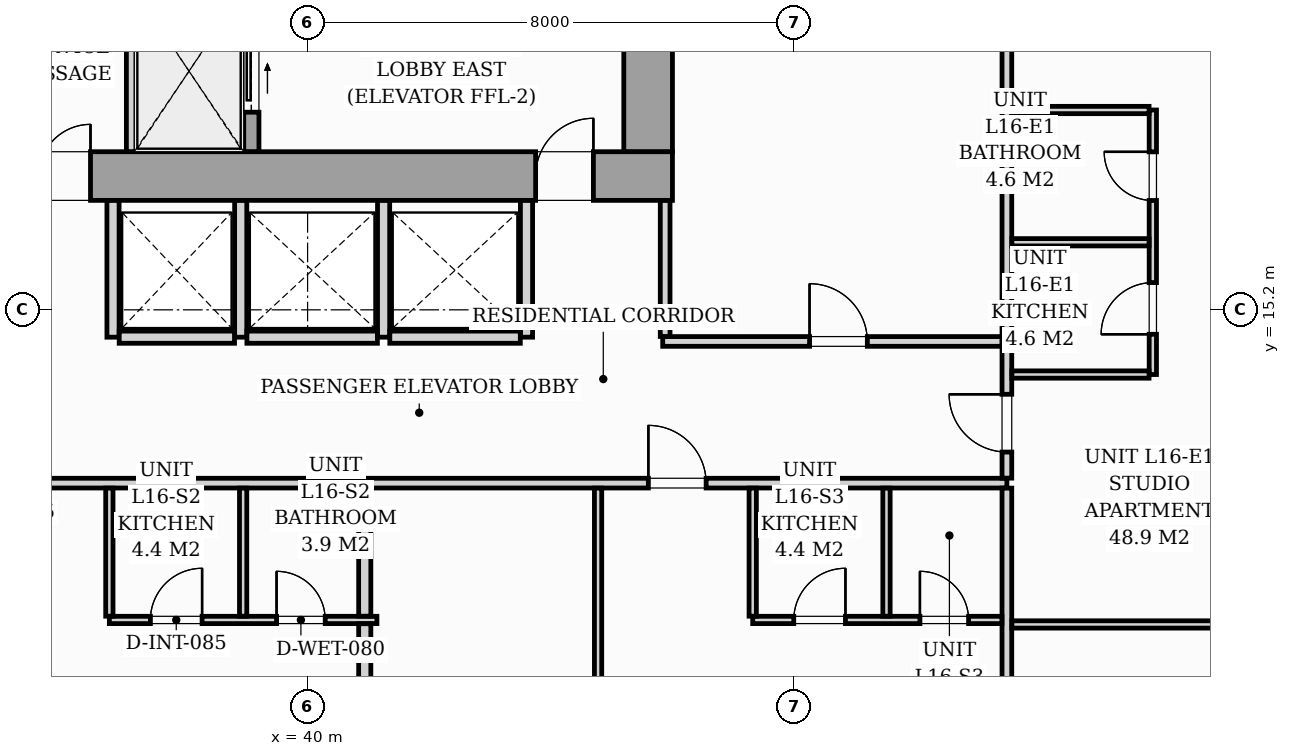
"""IFC4 building model, lengths in metres.
Left out: names, types, materials, properties, quantities, classifications, styles, units other than length and angle.
Written with IfcOpenShell. Run it as: python <this file> out.ifc"""

import sys

from ifc_helpers import new_model, si_unit, direction, frame, frame_2d, origin, origin_2d, place, context, subcontext, project, spatial, rectangle, i_section, extrude, source, transform, mapped, element, fill, save


model = new_model("IFC4")
c1 = context("Model", 3, precision=1e-05, world=origin(), true_north=direction((0.0, 1.0)))
c2 = subcontext(c1, "Body", "Model", "MODEL_VIEW")
j1 = project(units=[si_unit("LENGTHUNIT", "METRE"), si_unit("PLANEANGLEUNIT", "RADIAN")], contexts=[c1])
p1 = place(None, origin())
s1 = spatial("IfcSite", under=j1, at=p1, CompositionType="ELEMENT")
p2 = place(p1, origin())
s2 = spatial("IfcBuilding", under=s1, at=p2, CompositionType="ELEMENT")
p3 = place(p2, frame((0.0, 0.0, 58.2)))
s3 = spatial("IfcBuildingStorey", under=s2, at=p3, CompositionType="ELEMENT", Elevation=58.2)
m1 = source(origin(), c2, "Body", "SweptSolid", [
    extrude(i_section(OverallWidth=0.437, OverallDepth=0.514, WebThickness=0.061, FlangeThickness=0.097, FilletRadius=0.018, at=origin_2d()), origin(), (0.0, 0.0, 1.0), 3.196),
])
for number, where, z_axis, x_axis in (
    (1, (38.88, 17.4, 0.002), (0.0, 0.0, 1.0), (1.0, 0.0, 0.0)),
    (2, (45.6, 17.4, 0.002), (0.0, 0.0, 1.0), (1.0, 0.0, 0.0)),
):
    element("IfcColumn", number, at=place(p3, frame(where, z_axis=z_axis, x_axis=x_axis)), inside=s3, PredefinedType="PILASTER", context=c2, shape_type="MappedRepresentation", body=[
        mapped(m1, transform((0.0, 0.0, 0.0), scale=1.0)),
    ])
p4 = place(p3, frame((26.0, 17.4, 0.0), z_axis=(0.0, 0.0, 1.0), x_axis=(1.0, 0.0, 0.0)))
e3 = element("IfcWall", 3, at=p4, inside=s3, PredefinedType="SHEAR", context=c2, shape_type="SweptSolid", body=[
    extrude(rectangle(XDim=20.0, YDim=0.8, at=frame_2d((10.0, 0.0))), origin(), (0.0, 0.0, 1.0), 3.2),
])
p5 = place(p4, frame((1.15, 0.0, 0.0)))
e4 = element("IfcOpeningElement", 4, at=p5, cuts=e3, PredefinedType="OPENING", context=c2, shape_type="SweptSolid", body=[
    extrude(rectangle(XDim=0.95, YDim=2.06, at=frame_2d((0.475, 1.03))), frame((0.0, 0.41, 0.0), z_axis=(0.0, -1.0, 0.0), x_axis=(1.0, 0.0, 0.0)), (0.0, 0.0, 1.0), 0.82),
])
p6 = place(p4, frame((9.58, 0.0, 0.0)))
e5 = element("IfcOpeningElement", 5, at=p6, cuts=e3, PredefinedType="OPENING", context=c2, shape_type="SweptSolid", body=[
    extrude(rectangle(XDim=0.85, YDim=2.0, at=frame_2d((0.425, 1.0))), frame((0.0, 0.41, 0.0), z_axis=(0.0, -1.0, 0.0), x_axis=(1.0, 0.0, 0.0)), (0.0, 0.0, 1.0), 0.82),
])
p7 = place(p4, frame((17.75, 0.0, 0.0)))
e6 = element("IfcOpeningElement", 6, at=p7, cuts=e3, PredefinedType="OPENING", context=c2, shape_type="SweptSolid", body=[
    extrude(rectangle(XDim=0.95, YDim=2.06, at=frame_2d((0.475, 1.03))), frame((0.0, 0.41, 0.0), z_axis=(0.0, -1.0, 0.0), x_axis=(1.0, 0.0, 0.0)), (0.0, 0.0, 1.0), 0.82),
])
p8 = place(p3, frame((45.6, 17.802, 0.0), z_axis=(0.0, 0.0, 1.0), x_axis=(0.0, 1.0, 0.0)))
e7 = element("IfcWall", 7, at=p8, inside=s3, PredefinedType="SHEAR", context=c2, shape_type="SweptSolid", body=[
    extrude(rectangle(XDim=5.796, YDim=0.8, at=frame_2d((2.898, 0.0))), origin(), (0.0, 0.0, 1.0), 3.2),
])
p9 = place(p3, frame((37.1, 17.802, 0.0), z_axis=(0.0, 0.0, 1.0), x_axis=(0.0, 1.0, 0.0)))
e8 = element("IfcWall", 8, at=p9, inside=s3, PredefinedType="PARTITIONING", context=c2, shape_type="SweptSolid", body=[
    extrude(rectangle(XDim=2.646, YDim=0.16, at=frame_2d((1.323, 0.0))), origin(), (0.0, 0.0, 1.0), 2.94),
])
p10 = place(p3, frame((39.075, 17.802, 0.0), z_axis=(0.0, 0.0, 1.0), x_axis=(0.0, 1.0, 0.0)))
e9 = element("IfcWall", 9, at=p10, inside=s3, PredefinedType="SOLIDWALL", context=c2, shape_type="SweptSolid", body=[
    extrude(rectangle(XDim=2.646, YDim=0.25, at=frame_2d((1.323, 0.0))), origin(), (0.0, 0.0, 1.0), 3.2),
])
p11 = place(p10, frame((0.648, 0.0, 0.0)))
e10 = element("IfcOpeningElement", 10, at=p11, cuts=e9, PredefinedType="OPENING", context=c2, shape_type="SweptSolid", body=[
    extrude(rectangle(XDim=1.1, YDim=2.08, at=frame_2d((0.55, 1.04))), frame((0.0, 0.135, 0.0), z_axis=(0.0, -1.0, 0.0), x_axis=(1.0, 0.0, 0.0)), (0.0, 0.0, 1.0), 0.27),
])
for number, where, z_axis, x_axis in (
    (11, (36.8, 14.75, 0.0), (0.0, 0.0, 1.0), (0.0, 1.0, 0.0)),
    (12, (38.9, 14.75, 0.0), (0.0, 0.0, 1.0), (0.0, 1.0, 0.0)),
):
    element("IfcWall", number, at=place(p3, frame(where, z_axis=z_axis, x_axis=x_axis)), inside=s3, PredefinedType="PARTITIONING", context=c2, shape_type="SweptSolid", body=[
        extrude(rectangle(XDim=2.248, YDim=0.2, at=frame_2d((1.124, 0.0))), origin(), (0.0, 0.0, 1.0), 2.94),
    ])
p12 = place(p3, frame((36.902, 14.75, 0.0), z_axis=(0.0, 0.0, 1.0), x_axis=(1.0, 0.0, 0.0)))
e13 = element("IfcWall", 13, at=p12, inside=s3, PredefinedType="PARTITIONING", context=c2, shape_type="SweptSolid", body=[
    extrude(rectangle(XDim=1.896, YDim=0.2, at=frame_2d((0.948, 0.0))), origin(), (0.0, 0.0, 1.0), 2.94),
])
for number, where, z_axis, x_axis in (
    (14, (41.25, 14.75, 0.0), (0.0, 0.0, 1.0), (0.0, 1.0, 0.0)),
    (15, (43.6, 14.75, 0.0), (0.0, 0.0, 1.0), (0.0, 1.0, 0.0)),
):
    element("IfcWall", number, at=place(p3, frame(where, z_axis=z_axis, x_axis=x_axis)), inside=s3, PredefinedType="PARTITIONING", context=c2, shape_type="SweptSolid", body=[
        extrude(rectangle(XDim=2.248, YDim=0.2, at=frame_2d((1.124, 0.0))), origin(), (0.0, 0.0, 1.0), 2.94),
    ])
for number, where, z_axis, x_axis in (
    (16, (39.002, 14.75, 0.0), (0.0, 0.0, 1.0), (1.0, 0.0, 0.0)),
    (17, (41.352, 14.75, 0.0), (0.0, 0.0, 1.0), (1.0, 0.0, 0.0)),
):
    element("IfcWall", number, at=place(p3, frame(where, z_axis=z_axis, x_axis=x_axis)), inside=s3, PredefinedType="PARTITIONING", context=c2, shape_type="SweptSolid", body=[
        extrude(rectangle(XDim=2.146, YDim=0.2, at=frame_2d((1.073, 0.0))), origin(), (0.0, 0.0, 1.0), 2.94),
    ])
p13 = place(p3, frame((16.3, 12.35, 0.0), z_axis=(0.0, 0.0, 1.0), x_axis=(1.0, 0.0, 0.0)))
e18 = element("IfcWall", 18, at=p13, inside=s3, PredefinedType="PARTITIONING", context=c2, shape_type="SweptSolid", body=[
    extrude(rectangle(XDim=35.2, YDim=0.16, at=frame_2d((17.6, 0.0))), origin(), (0.0, 0.0, 1.0), 2.94),
])
p14 = place(p13, frame((6.307, 0.0, 0.0)))
e19 = element("IfcOpeningElement", 19, at=p14, cuts=e18, PredefinedType="OPENING", context=c2, shape_type="SweptSolid", body=[
    extrude(rectangle(XDim=0.95, YDim=2.06, at=frame_2d((0.475, 1.03))), frame((0.0, 0.09, 0.0), z_axis=(0.0, -1.0, 0.0), x_axis=(1.0, 0.0, 0.0)), (0.0, 0.0, 1.0), 0.18),
])
p15 = place(p13, frame((18.392, 0.0, 0.0)))
e20 = element("IfcOpeningElement", 20, at=p15, cuts=e18, PredefinedType="OPENING", context=c2, shape_type="SweptSolid", body=[
    extrude(rectangle(XDim=0.95, YDim=2.06, at=frame_2d((0.475, 1.03))), frame((0.0, 0.09, 0.0), z_axis=(0.0, -1.0, 0.0), x_axis=(1.0, 0.0, 0.0)), (0.0, 0.0, 1.0), 0.18),
])
p16 = place(p13, frame((29.304, 0.0, 0.0)))
e21 = element("IfcOpeningElement", 21, at=p16, cuts=e18, PredefinedType="OPENING", context=c2, shape_type="SweptSolid", body=[
    extrude(rectangle(XDim=0.95, YDim=2.06, at=frame_2d((0.475, 1.03))), frame((0.0, 0.09, 0.0), z_axis=(0.0, -1.0, 0.0), x_axis=(1.0, 0.0, 0.0)), (0.0, 0.0, 1.0), 0.18),
])
p17 = place(p3, frame((51.5, 2.962, 0.0), z_axis=(0.0, 0.0, 1.0), x_axis=(0.0, 1.0, 0.0)))
e22 = element("IfcWall", 22, at=p17, inside=s3, PredefinedType="PARTITIONING", context=c2, shape_type="SweptSolid", body=[
    extrude(rectangle(XDim=9.306, YDim=0.16, at=frame_2d((4.653, 0.0))), origin(), (0.0, 0.0, 1.0), 2.94),
])
p18 = place(p3, frame((51.5, 12.432, 0.0), z_axis=(0.0, 0.0, 1.0), x_axis=(0.0, 1.0, 0.0)))
e23 = element("IfcWall", 23, at=p18, inside=s3, PredefinedType="PARTITIONING", context=c2, shape_type="SweptSolid", body=[
    extrude(rectangle(XDim=15.006, YDim=0.16, at=frame_2d((7.503, 0.0))), origin(), (0.0, 0.0, 1.0), 2.94),
])
p19 = place(p18, frame((0.429, 0.0, 0.0)))
e24 = element("IfcOpeningElement", 24, at=p19, cuts=e23, PredefinedType="OPENING", context=c2, shape_type="SweptSolid", body=[
    extrude(rectangle(XDim=0.95, YDim=2.06, at=frame_2d((0.475, 1.03))), frame((0.0, 0.09, 0.0), z_axis=(0.0, -1.0, 0.0), x_axis=(1.0, 0.0, 0.0)), (0.0, 0.0, 1.0), 0.18),
])
p20 = place(p3, frame((36.74, 10.1, 0.0), z_axis=(0.0, 0.0, 1.0), x_axis=(1.0, 0.0, 0.0)))
e25 = element("IfcWall", 25, at=p20, inside=s3, PredefinedType="PARTITIONING", context=c2, shape_type="SweptSolid", body=[
    extrude(rectangle(XDim=4.4, YDim=0.12, at=frame_2d((2.2, 0.0))), origin(), (0.0, 0.0, 1.0), 2.94),
])
p21 = place(p20, frame((0.675, 0.0, 0.0)))
e26 = element("IfcOpeningElement", 26, at=p21, cuts=e25, PredefinedType="OPENING", context=c2, shape_type="SweptSolid", body=[
    extrude(rectangle(XDim=0.85, YDim=2.05, at=frame_2d((0.425, 1.025))), frame((0.0, 0.07, 0.0), z_axis=(0.0, -1.0, 0.0), x_axis=(1.0, 0.0, 0.0)), (0.0, 0.0, 1.0), 0.14),
])
p22 = place(p20, frame((2.75, 0.0, 0.0)))
e27 = element("IfcOpeningElement", 27, at=p22, cuts=e25, PredefinedType="OPENING", context=c2, shape_type="SweptSolid", body=[
    extrude(rectangle(XDim=0.8, YDim=2.02, at=frame_2d((0.4, 1.01))), frame((0.0, 0.07, 0.0), z_axis=(0.0, -1.0, 0.0), x_axis=(1.0, 0.0, 0.0)), (0.0, 0.0, 1.0), 0.14),
])
for number, where, z_axis, x_axis in (
    (28, (36.74, 10.162, 0.0), (0.0, 0.0, 1.0), (0.0, 1.0, 0.0)),
    (29, (38.94, 10.162, 0.0), (0.0, 0.0, 1.0), (0.0, 1.0, 0.0)),
):
    element("IfcWall", number, at=place(p3, frame(where, z_axis=z_axis, x_axis=x_axis)), inside=s3, PredefinedType="PARTITIONING", context=c2, shape_type="SweptSolid", body=[
        extrude(rectangle(XDim=2.106, YDim=0.12, at=frame_2d((1.053, 0.0))), origin(), (0.0, 0.0, 1.0), 2.94),
    ])
p23 = place(p3, frame((40.94, 2.962, 0.0), z_axis=(0.0, 0.0, 1.0), x_axis=(0.0, 1.0, 0.0)))
e30 = element("IfcWall", 30, at=p23, inside=s3, PredefinedType="PARTITIONING", context=c2, shape_type="SweptSolid", body=[
    extrude(rectangle(XDim=7.076, YDim=0.2, at=frame_2d((3.538, 0.0))), origin(), (0.0, 0.0, 1.0), 2.94),
])
p24 = place(p3, frame((40.94, 10.162, 0.0), z_axis=(0.0, 0.0, 1.0), x_axis=(0.0, 1.0, 0.0)))
e31 = element("IfcWall", 31, at=p24, inside=s3, PredefinedType="PARTITIONING", context=c2, shape_type="SweptSolid", body=[
    extrude(rectangle(XDim=2.106, YDim=0.2, at=frame_2d((1.053, 0.0))), origin(), (0.0, 0.0, 1.0), 2.94),
])
p25 = place(p3, frame((47.32, 10.1, 0.0), z_axis=(0.0, 0.0, 1.0), x_axis=(1.0, 0.0, 0.0)))
e32 = element("IfcWall", 32, at=p25, inside=s3, PredefinedType="PARTITIONING", context=c2, shape_type="SweptSolid", body=[
    extrude(rectangle(XDim=4.098, YDim=0.12, at=frame_2d((2.049, 0.0))), origin(), (0.0, 0.0, 1.0), 2.94),
])
p26 = place(p25, frame((0.675, 0.0, 0.0)))
e33 = element("IfcOpeningElement", 33, at=p26, cuts=e32, PredefinedType="OPENING", context=c2, shape_type="SweptSolid", body=[
    extrude(rectangle(XDim=0.85, YDim=2.05, at=frame_2d((0.425, 1.025))), frame((0.0, 0.07, 0.0), z_axis=(0.0, -1.0, 0.0), x_axis=(1.0, 0.0, 0.0)), (0.0, 0.0, 1.0), 0.14),
])
p27 = place(p25, frame((2.75, 0.0, 0.0)))
e34 = element("IfcOpeningElement", 34, at=p27, cuts=e32, PredefinedType="OPENING", context=c2, shape_type="SweptSolid", body=[
    extrude(rectangle(XDim=0.8, YDim=2.02, at=frame_2d((0.4, 1.01))), frame((0.0, 0.07, 0.0), z_axis=(0.0, -1.0, 0.0), x_axis=(1.0, 0.0, 0.0)), (0.0, 0.0, 1.0), 0.14),
])
for number, where, z_axis, x_axis in (
    (35, (47.32, 10.162, 0.0), (0.0, 0.0, 1.0), (0.0, 1.0, 0.0)),
    (36, (49.52, 10.162, 0.0), (0.0, 0.0, 1.0), (0.0, 1.0, 0.0)),
):
    element("IfcWall", number, at=place(p3, frame(where, z_axis=z_axis, x_axis=x_axis)), inside=s3, PredefinedType="PARTITIONING", context=c2, shape_type="SweptSolid", body=[
        extrude(rectangle(XDim=2.106, YDim=0.12, at=frame_2d((1.053, 0.0))), origin(), (0.0, 0.0, 1.0), 2.94),
    ])
p28 = place(p3, frame((44.777, 2.962, 0.0), z_axis=(0.0, 0.0, 1.0), x_axis=(0.0, 1.0, 0.0)))
e37 = element("IfcWall", 37, at=p28, inside=s3, PredefinedType="PARTITIONING", context=c2, shape_type="SweptSolid", body=[
    extrude(rectangle(XDim=9.306, YDim=0.12, at=frame_2d((4.653, 0.0))), origin(), (0.0, 0.0, 1.0), 2.136),
])
p29 = place(p28, frame((4.218, 0.0, 0.0)))
e38 = element("IfcOpeningElement", 38, at=p29, cuts=e37, PredefinedType="OPENING", context=c2, shape_type="SweptSolid", body=[
    extrude(rectangle(XDim=0.85, YDim=2.01, at=frame_2d((0.425, 1.005))), frame((0.0, 0.07, 0.0), z_axis=(0.0, -1.0, 0.0), x_axis=(1.0, 0.0, 0.0)), (0.0, 0.0, 1.0), 0.14),
])
p30 = place(p3, frame((53.9, 14.136, 0.0), z_axis=(0.0, 0.0, 1.0), x_axis=(0.0, 1.0, 0.0)))
e39 = element("IfcWall", 39, at=p30, inside=s3, PredefinedType="PARTITIONING", context=c2, shape_type="SweptSolid", body=[
    extrude(rectangle(XDim=4.35, YDim=0.12, at=frame_2d((2.175, 0.0))), origin(), (0.0, 0.0, 1.0), 2.94),
])
p31 = place(p30, frame((0.662, 0.0, 0.0)))
e40 = element("IfcOpeningElement", 40, at=p31, cuts=e39, PredefinedType="OPENING", context=c2, shape_type="SweptSolid", body=[
    extrude(rectangle(XDim=0.85, YDim=2.05, at=frame_2d((0.425, 1.025))), frame((0.0, 0.07, 0.0), z_axis=(0.0, -1.0, 0.0), x_axis=(1.0, 0.0, 0.0)), (0.0, 0.0, 1.0), 0.14),
])
p32 = place(p30, frame((2.862, 0.0, 0.0)))
e41 = element("IfcOpeningElement", 41, at=p32, cuts=e39, PredefinedType="OPENING", context=c2, shape_type="SweptSolid", body=[
    extrude(rectangle(XDim=0.8, YDim=2.02, at=frame_2d((0.4, 1.01))), frame((0.0, 0.07, 0.0), z_axis=(0.0, -1.0, 0.0), x_axis=(1.0, 0.0, 0.0)), (0.0, 0.0, 1.0), 0.14),
])
p33 = place(p3, frame((51.582, 16.311, 0.0), z_axis=(0.0, 0.0, 1.0), x_axis=(1.0, 0.0, 0.0)))
e42 = element("IfcWall", 42, at=p33, inside=s3, PredefinedType="PARTITIONING", context=c2, shape_type="SweptSolid", body=[
    extrude(rectangle(XDim=2.256, YDim=0.12, at=frame_2d((1.128, 0.0))), origin(), (0.0, 0.0, 1.0), 2.045),
])
for number, where, z_axis, x_axis in (
    (43, (51.582, 14.136, 0.0), (0.0, 0.0, 1.0), (1.0, 0.0, 0.0)),
    (44, (51.582, 18.486, 0.0), (0.0, 0.0, 1.0), (1.0, 0.0, 0.0)),
):
    element("IfcWall", number, at=place(p3, frame(where, z_axis=z_axis, x_axis=x_axis)), inside=s3, PredefinedType="PARTITIONING", context=c2, shape_type="SweptSolid", body=[
        extrude(rectangle(XDim=2.256, YDim=0.12, at=frame_2d((1.128, 0.0))), origin(), (0.0, 0.0, 1.0), 2.94),
    ])
p34 = place(p3, frame((51.582, 10.026, 0.0), z_axis=(0.0, 0.0, 1.0), x_axis=(1.0, 0.0, 0.0)))
e45 = element("IfcWall", 45, at=p34, inside=s3, PredefinedType="PARTITIONING", context=c2, shape_type="SweptSolid", body=[
    extrude(rectangle(XDim=8.138, YDim=0.12, at=frame_2d((4.069, 0.0))), origin(), (0.0, 0.0, 1.0), 2.94),
])
p35 = place(p34, frame((3.653, 0.0, 0.0)))
e46 = element("IfcOpeningElement", 46, at=p35, cuts=e45, PredefinedType="OPENING", context=c2, shape_type="SweptSolid", body=[
    extrude(rectangle(XDim=0.85, YDim=2.05, at=frame_2d((0.425, 1.025))), frame((0.0, 0.07, 0.0), z_axis=(0.0, -1.0, 0.0), x_axis=(1.0, 0.0, 0.0)), (0.0, 0.0, 1.0), 0.14),
])
p36 = place(p3, frame((45.84, 14.68, 0.0), z_axis=(0.0, 0.0, 1.0), x_axis=(1.0, 0.0, 0.0)))
e47 = element("IfcWall", 47, at=p36, inside=s3, PredefinedType="PARTITIONING", context=c2, shape_type="SweptSolid", body=[
    extrude(rectangle(XDim=5.578, YDim=0.16, at=frame_2d((2.789, 0.0))), origin(), (0.0, 0.0, 1.0), 2.94),
])
p37 = place(p36, frame((2.415, 0.0, 0.0)))
e48 = element("IfcOpeningElement", 48, at=p37, cuts=e47, PredefinedType="OPENING", context=c2, shape_type="SweptSolid", body=[
    extrude(rectangle(XDim=0.95, YDim=2.06, at=frame_2d((0.475, 1.03))), frame((0.0, 0.09, 0.0), z_axis=(0.0, -1.0, 0.0), x_axis=(1.0, 0.0, 0.0)), (0.0, 0.0, 1.0), 0.18),
])
p38 = place(p3, frame((45.88, 14.762, 0.0), z_axis=(0.0, 0.0, 1.0), x_axis=(0.0, 1.0, 0.0)))
e49 = element("IfcWall", 49, at=p38, inside=s3, PredefinedType="PARTITIONING", context=c2, shape_type="SweptSolid", body=[
    extrude(rectangle(XDim=2.236, YDim=0.16, at=frame_2d((1.118, 0.0))), origin(), (0.0, 0.0, 1.0), 2.94),
])
m2 = source(origin(), c2, "Body", "SweptSolid", [
    extrude(rectangle(XDim=0.85, YDim=2.0, at=frame_2d((0.425, 1.0))), frame((0.0, 0.025, 0.0), z_axis=(0.0, -1.0, 0.0), x_axis=(1.0, 0.0, 0.0)), (0.0, 0.0, 1.0), 0.05),
])
p39 = place(p6, origin())
e50 = element("IfcDoor", 50, at=p39, inside=s3, OperationType="SINGLE_SWING_RIGHT", PredefinedType="DOOR", context=c2, shape_type="MappedRepresentation", body=[
    mapped(m2, transform((0.0, 0.0, 0.0), scale=1.0)),
])
fill(e5, e50)
m3 = source(origin(), c2, "Body", "SweptSolid", [
    extrude(rectangle(XDim=0.95, YDim=2.06, at=frame_2d((0.475, 1.03))), frame((0.0, 0.025, 0.0), z_axis=(0.0, -1.0, 0.0), x_axis=(1.0, 0.0, 0.0)), (0.0, 0.0, 1.0), 0.05),
])
p40 = place(p7, origin())
e51 = element("IfcDoor", 51, at=p40, inside=s3, OperationType="SINGLE_SWING_RIGHT", PredefinedType="DOOR", context=c2, shape_type="MappedRepresentation", body=[
    mapped(m3, transform((0.0, 0.0, 0.0), scale=1.0)),
])
fill(e6, e51)
m4 = source(origin(), c2, "Body", "SweptSolid", [
    extrude(rectangle(XDim=1.1, YDim=2.08, at=frame_2d((0.55, 1.04))), frame((0.0, 0.025, 0.0), z_axis=(0.0, -1.0, 0.0), x_axis=(1.0, 0.0, 0.0)), (0.0, 0.0, 1.0), 0.05),
])
p41 = place(p11, origin())
e52 = element("IfcDoor", 52, at=p41, inside=s3, OperationType="SLIDING_TO_RIGHT", PredefinedType="DOOR", context=c2, shape_type="MappedRepresentation", body=[
    mapped(m4, transform((0.0, 0.0, 0.0), scale=1.0)),
])
fill(e10, e52)
m5 = source(origin(), c2, "Body", "SweptSolid", [
    extrude(rectangle(XDim=0.85, YDim=2.05, at=frame_2d((0.425, 1.025))), frame((0.0, 0.025, 0.0), z_axis=(0.0, -1.0, 0.0), x_axis=(1.0, 0.0, 0.0)), (0.0, 0.0, 1.0), 0.05),
])
p42 = place(p21, origin())
e53 = element("IfcDoor", 53, at=p42, inside=s3, OperationType="SINGLE_SWING_RIGHT", PredefinedType="DOOR", context=c2, shape_type="MappedRepresentation", body=[
    mapped(m5, transform((0.0, 0.0, 0.0), scale=1.0)),
])
fill(e26, e53)
m6 = source(origin(), c2, "Body", "SweptSolid", [
    extrude(rectangle(XDim=0.8, YDim=2.02, at=frame_2d((0.4, 1.01))), frame((0.0, 0.025, 0.0), z_axis=(0.0, -1.0, 0.0), x_axis=(1.0, 0.0, 0.0)), (0.0, 0.0, 1.0), 0.05),
])
p43 = place(p22, origin())
e54 = element("IfcDoor", 54, at=p43, inside=s3, OperationType="SINGLE_SWING_LEFT", PredefinedType="DOOR", context=c2, shape_type="MappedRepresentation", body=[
    mapped(m6, transform((0.0, 0.0, 0.0), scale=1.0)),
])
fill(e27, e54)
m7 = source(origin(), c2, "Body", "SweptSolid", [
    extrude(rectangle(XDim=0.95, YDim=2.06, at=frame_2d((0.475, 1.03))), frame((0.0, 0.025, 0.0), z_axis=(0.0, -1.0, 0.0), x_axis=(1.0, 0.0, 0.0)), (0.0, 0.0, 1.0), 0.05),
])
p44 = place(p16, origin())
e55 = element("IfcDoor", 55, at=p44, inside=s3, OperationType="SINGLE_SWING_LEFT", PredefinedType="DOOR", context=c2, shape_type="MappedRepresentation", body=[
    mapped(m7, transform((0.0, 0.0, 0.0), scale=1.0)),
])
fill(e21, e55)
p45 = place(p26, origin())
e56 = element("IfcDoor", 56, at=p45, inside=s3, OperationType="SINGLE_SWING_RIGHT", PredefinedType="DOOR", context=c2, shape_type="MappedRepresentation", body=[
    mapped(m5, transform((0.0, 0.0, 0.0), scale=1.0)),
])
fill(e33, e56)
p46 = place(p27, origin())
e57 = element("IfcDoor", 57, at=p46, inside=s3, OperationType="SINGLE_SWING_LEFT", PredefinedType="DOOR", context=c2, shape_type="MappedRepresentation", body=[
    mapped(m6, transform((0.0, 0.0, 0.0), scale=1.0)),
])
fill(e34, e57)
p47 = place(p19, origin())
e58 = element("IfcDoor", 58, at=p47, inside=s3, OperationType="SINGLE_SWING_RIGHT", PredefinedType="DOOR", context=c2, shape_type="MappedRepresentation", body=[
    mapped(m7, transform((0.0, 0.0, 0.0), scale=1.0)),
])
fill(e24, e58)
p48 = place(p31, origin())
e59 = element("IfcDoor", 59, at=p48, inside=s3, OperationType="SINGLE_SWING_LEFT", PredefinedType="DOOR", context=c2, shape_type="MappedRepresentation", body=[
    mapped(m5, transform((0.0, 0.0, 0.0), scale=1.0)),
])
fill(e40, e59)
p49 = place(p32, origin())
e60 = element("IfcDoor", 60, at=p49, inside=s3, OperationType="SINGLE_SWING_RIGHT", PredefinedType="DOOR", context=c2, shape_type="MappedRepresentation", body=[
    mapped(m6, transform((0.0, 0.0, 0.0), scale=1.0)),
])
fill(e41, e60)
p50 = place(p37, origin())
e61 = element("IfcDoor", 61, at=p50, inside=s3, OperationType="SINGLE_SWING_LEFT", PredefinedType="DOOR", context=c2, shape_type="MappedRepresentation", body=[
    mapped(m7, transform((0.0, 0.0, 0.0), scale=1.0)),
])
fill(e48, e61)
save(model, sys.argv[1])
